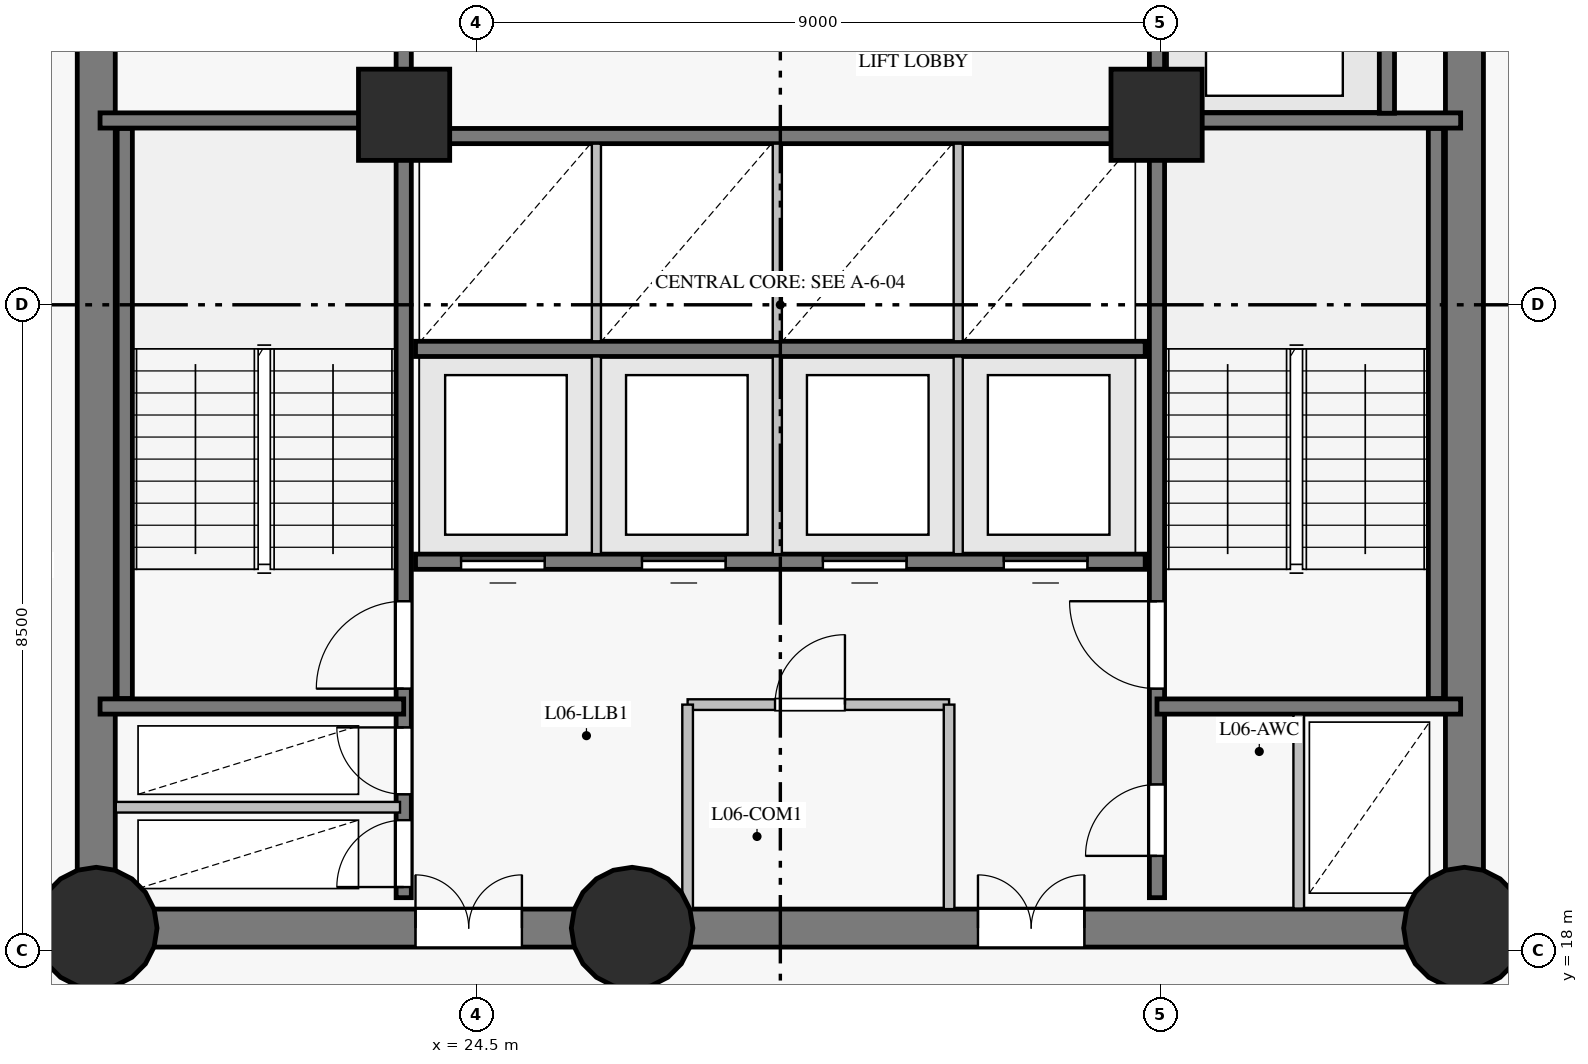
"""IFC4 building model, lengths in metres.
Left out: names, types, materials, properties, quantities, classifications, styles, units other than length and angle.
Written with IfcOpenShell. Run it as: python <this file> out.ifc"""

import sys

from ifc_helpers import new_model, si_unit, direction, frame, frame_2d, origin, origin_with_axes, origin_2d, place, context, subcontext, project, spatial, rectangle, circle, extrude, source, transform, mapped, element, fill, save


model = new_model("IFC4")
c1 = context("Model", 3, precision=1e-05, world=origin(), true_north=direction((0.0, 1.0)))
c2 = subcontext(c1, "Body", "Model", "MODEL_VIEW")
j1 = project(units=[si_unit("LENGTHUNIT", "METRE"), si_unit("PLANEANGLEUNIT", "RADIAN")], contexts=[c1])
p1 = place(None, origin())
s1 = spatial("IfcSite", under=j1, at=p1, CompositionType="ELEMENT")
p2 = place(p1, origin())
s2 = spatial("IfcBuilding", under=s1, at=p2, CompositionType="ELEMENT")
p3 = place(p2, frame((0.0, 0.0, 26.5)))
s3 = spatial("IfcBuildingStorey", under=s2, at=p3, CompositionType="ELEMENT", Elevation=26.5)
p4 = place(p3, frame((19.5, 18.3, 0.0), z_axis=(0.0, 0.0, 1.0), x_axis=(1.0, 0.0, 0.0)))
e1 = element("IfcWall", 1, at=p4, inside=s3, PredefinedType="SHEAR", context=c2, shape_type="SweptSolid", body=[
    extrude(rectangle(XDim=7.05, YDim=0.5, at=frame_2d((3.525, 0.0))), origin(), (0.0, 0.0, 1.0), 3.35),
])
p5 = place(p4, frame((4.2, 0.0, 0.0)))
e2 = element("IfcOpeningElement", 2, at=p5, cuts=e1, PredefinedType="OPENING", context=c2, shape_type="SweptSolid", body=[
    extrude(rectangle(XDim=1.4, YDim=2.2, at=frame_2d((0.7, 1.1))), frame((0.0, 0.26, 0.0), z_axis=(0.0, -1.0, 0.0), x_axis=(1.0, 0.0, 0.0)), (0.0, 0.0, 1.0), 0.52),
])
p6 = place(p3, frame((26.55, 18.3, 0.0), z_axis=(0.0, 0.0, 1.0), x_axis=(1.0, 0.0, 0.0)))
e3 = element("IfcWall", 3, at=p6, inside=s3, PredefinedType="SHEAR", context=c2, shape_type="SweptSolid", body=[
    extrude(rectangle(XDim=10.95, YDim=0.5, at=frame_2d((5.475, 0.0))), origin(), (0.0, 0.0, 1.0), 3.35),
])
p7 = place(p6, frame((4.55, 0.0, 0.0)))
e4 = element("IfcOpeningElement", 4, at=p7, cuts=e3, PredefinedType="OPENING", context=c2, shape_type="SweptSolid", body=[
    extrude(rectangle(XDim=1.4, YDim=2.2, at=frame_2d((0.7, 1.1))), frame((0.0, 0.26, 0.0), z_axis=(0.0, -1.0, 0.0), x_axis=(1.0, 0.0, 0.0)), (0.0, 0.0, 1.0), 0.52),
])
p8 = place(p3, frame((37.5, 18.3, 0.0), z_axis=(0.0, 0.0, 1.0), x_axis=(0.0, 1.0, 0.0)))
e5 = element("IfcWall", 5, at=p8, inside=s3, PredefinedType="SHEAR", context=c2, shape_type="SweptSolid", body=[
    extrude(rectangle(XDim=16.4, YDim=0.5, at=frame_2d((8.2, 0.0))), origin(), (0.0, 0.0, 1.0), 3.35),
])
p9 = place(p8, frame((14.06, 0.0, 0.0)))
e6 = element("IfcOpeningElement", 6, at=p9, cuts=e5, PredefinedType="OPENING", context=c2, shape_type="SweptSolid", body=[
    extrude(rectangle(XDim=1.2, YDim=2.15, at=frame_2d((0.6, 1.075))), frame((0.0, 0.26, 0.0), z_axis=(0.0, -1.0, 0.0), x_axis=(1.0, 0.0, 0.0)), (0.0, 0.0, 1.0), 0.52),
])
p10 = place(p3, frame((19.5, 34.7, 0.0), z_axis=(0.0, 0.0, 1.0), x_axis=(0.0, -1.0, 0.0)))
e7 = element("IfcWall", 7, at=p10, inside=s3, PredefinedType="SHEAR", context=c2, shape_type="SweptSolid", body=[
    extrude(rectangle(XDim=16.4, YDim=0.5, at=frame_2d((8.2, 0.0))), origin(), (0.0, 0.0, 1.0), 3.35),
])
p11 = place(p10, frame((3.1, 0.0, 0.0)))
e8 = element("IfcOpeningElement", 8, at=p11, cuts=e7, PredefinedType="OPENING", context=c2, shape_type="SweptSolid", body=[
    extrude(rectangle(XDim=1.1, YDim=2.15, at=frame_2d((0.55, 1.075))), frame((0.0, 0.26, 0.0), z_axis=(0.0, -1.0, 0.0), x_axis=(1.0, 0.0, 0.0)), (0.0, 0.0, 1.0), 0.52),
])
m1 = source(origin_with_axes(), c2, "Body", "SweptSolid", [
    extrude(circle(Radius=0.8, at=origin_2d()), origin(), (0.0, 0.0, 1.0), 3.6),
])
for number, where, z_axis, x_axis in (
    (9, (19.5, 18.3, 0.0), (0.0, 0.0, 1.0), (1.0, 0.0, 0.0)),
    (10, (26.55, 18.3, 0.0), (0.0, 0.0, 1.0), (1.0, 0.0, 0.0)),
    (11, (37.5, 18.3, 0.0), (0.0, 0.0, 1.0), (1.0, 0.0, 0.0)),
):
    element("IfcColumn", number, at=place(p3, frame(where, z_axis=z_axis, x_axis=x_axis)), inside=s3, PredefinedType="COLUMN", context=c2, shape_type="MappedRepresentation", body=[
        mapped(m1, transform((0.0, 0.0, 0.0), scale=1.0)),
    ])
m2 = source(origin_with_axes(), c2, "Body", "SweptSolid", [
    extrude(rectangle(XDim=1.2, YDim=1.2, at=origin_2d()), origin(), (0.0, 0.0, 1.0), 3.6),
])
for number, where, z_axis, x_axis in (
    (12, (23.55, 29.0, 0.0), (0.0, 0.0, 1.0), (1.0, 0.0, 0.0)),
    (13, (33.45, 29.0, 0.0), (0.0, 0.0, 1.0), (1.0, 0.0, 0.0)),
):
    element("IfcColumn", number, at=place(p3, frame(where, z_axis=z_axis, x_axis=x_axis)), inside=s3, PredefinedType="COLUMN", context=c2, shape_type="MappedRepresentation", body=[
        mapped(m2, transform((0.0, 0.0, 0.0), scale=1.0)),
    ])
p12 = place(p3, frame((23.545, 18.7, 0.0), z_axis=(0.0, 0.0, 1.0), x_axis=(0.0, 1.0, 0.0)))
e14 = element("IfcWall", 14, at=p12, inside=s3, PredefinedType="SHEAR", context=c2, shape_type="SweptSolid", body=[
    extrude(rectangle(XDim=15.6, YDim=0.2, at=frame_2d((7.8, 0.0))), origin(), (0.0, 0.0, 1.0), 3.35),
])
p13 = place(p12, frame((2.75, 0.0, 0.0)))
e15 = element("IfcOpeningElement", 15, at=p13, cuts=e14, PredefinedType="OPENING", context=c2, shape_type="SweptSolid", body=[
    extrude(rectangle(XDim=1.15, YDim=2.15, at=frame_2d((0.575, 1.075))), frame((0.0, 0.11, 0.0), z_axis=(0.0, -1.0, 0.0), x_axis=(1.0, 0.0, 0.0)), (0.0, 0.0, 1.0), 0.22),
])
p14 = place(p12, frame((0.14, 0.0, 0.0)))
e16 = element("IfcOpeningElement", 16, at=p14, cuts=e14, PredefinedType="OPENING", context=c2, shape_type="SweptSolid", body=[
    extrude(rectangle(XDim=0.88, YDim=2.1, at=frame_2d((0.44, 1.05))), frame((0.0, 0.11, 0.0), z_axis=(0.0, -1.0, 0.0), x_axis=(1.0, 0.0, 0.0)), (0.0, 0.0, 1.0), 0.22),
])
p15 = place(p12, frame((1.36, 0.0, 0.0)))
e17 = element("IfcOpeningElement", 17, at=p15, cuts=e14, PredefinedType="OPENING", context=c2, shape_type="SweptSolid", body=[
    extrude(rectangle(XDim=0.88, YDim=2.1, at=frame_2d((0.44, 1.05))), frame((0.0, 0.11, 0.0), z_axis=(0.0, -1.0, 0.0), x_axis=(1.0, 0.0, 0.0)), (0.0, 0.0, 1.0), 0.22),
])
p16 = place(p12, frame((12.1, 0.0, 0.0)))
e18 = element("IfcOpeningElement", 18, at=p16, cuts=e14, PredefinedType="OPENING", context=c2, shape_type="SweptSolid", body=[
    extrude(rectangle(XDim=1.12, YDim=2.15, at=frame_2d((0.56, 1.075))), frame((0.0, 0.11, 0.0), z_axis=(0.0, -1.0, 0.0), x_axis=(1.0, 0.0, 0.0)), (0.0, 0.0, 1.0), 0.22),
])
p17 = place(p12, frame((14.05, 0.0, 0.0)))
e19 = element("IfcOpeningElement", 19, at=p17, cuts=e14, PredefinedType="OPENING", context=c2, shape_type="SweptSolid", body=[
    extrude(rectangle(XDim=1.12, YDim=2.15, at=frame_2d((0.56, 1.075))), frame((0.0, 0.11, 0.0), z_axis=(0.0, -1.0, 0.0), x_axis=(1.0, 0.0, 0.0)), (0.0, 0.0, 1.0), 0.22),
])
p18 = place(p3, frame((33.455, 18.7, 0.0), z_axis=(0.0, 0.0, 1.0), x_axis=(0.0, 1.0, 0.0)))
e20 = element("IfcWall", 20, at=p18, inside=s3, PredefinedType="SHEAR", context=c2, shape_type="SweptSolid", body=[
    extrude(rectangle(XDim=15.6, YDim=0.2, at=frame_2d((7.8, 0.0))), origin(), (0.0, 0.0, 1.0), 3.35),
])
p19 = place(p18, frame((2.75, 0.0, 0.0)))
e21 = element("IfcOpeningElement", 21, at=p19, cuts=e20, PredefinedType="OPENING", context=c2, shape_type="SweptSolid", body=[
    extrude(rectangle(XDim=1.15, YDim=2.15, at=frame_2d((0.575, 1.075))), frame((0.0, 0.11, 0.0), z_axis=(0.0, -1.0, 0.0), x_axis=(1.0, 0.0, 0.0)), (0.0, 0.0, 1.0), 0.22),
])
p20 = place(p18, frame((0.55, 0.0, 0.0)))
e22 = element("IfcOpeningElement", 22, at=p20, cuts=e20, PredefinedType="OPENING", context=c2, shape_type="SweptSolid", body=[
    extrude(rectangle(XDim=0.94, YDim=2.1, at=frame_2d((0.47, 1.05))), frame((0.0, 0.11, 0.0), z_axis=(0.0, -1.0, 0.0), x_axis=(1.0, 0.0, 0.0)), (0.0, 0.0, 1.0), 0.22),
])
p21 = place(p3, frame((23.7, 23.12, 0.0), z_axis=(0.0, 0.0, 1.0), x_axis=(1.0, 0.0, 0.0)))
e23 = element("IfcWall", 23, at=p21, inside=s3, PredefinedType="SHEAR", context=c2, shape_type="SweptSolid", body=[
    extrude(rectangle(XDim=9.6, YDim=0.2, at=frame_2d((4.8, 0.0))), origin(), (0.0, 0.0, 1.0), 3.35),
])
p22 = place(p21, frame((0.6, 0.0, 0.0)))
e24 = element("IfcOpeningElement", 24, at=p22, cuts=e23, PredefinedType="OPENING", context=c2, shape_type="SweptSolid", body=[
    extrude(rectangle(XDim=1.1, YDim=2.15, at=frame_2d((0.55, 1.075))), frame((0.0, 0.11, 0.0), z_axis=(0.0, -1.0, 0.0), x_axis=(1.0, 0.0, 0.0)), (0.0, 0.0, 1.0), 0.22),
])
p23 = place(p21, frame((2.98, 0.0, 0.0)))
e25 = element("IfcOpeningElement", 25, at=p23, cuts=e23, PredefinedType="OPENING", context=c2, shape_type="SweptSolid", body=[
    extrude(rectangle(XDim=1.1, YDim=2.15, at=frame_2d((0.55, 1.075))), frame((0.0, 0.11, 0.0), z_axis=(0.0, -1.0, 0.0), x_axis=(1.0, 0.0, 0.0)), (0.0, 0.0, 1.0), 0.22),
])
p24 = place(p21, frame((5.36, 0.0, 0.0)))
e26 = element("IfcOpeningElement", 26, at=p24, cuts=e23, PredefinedType="OPENING", context=c2, shape_type="SweptSolid", body=[
    extrude(rectangle(XDim=1.1, YDim=2.15, at=frame_2d((0.55, 1.075))), frame((0.0, 0.11, 0.0), z_axis=(0.0, -1.0, 0.0), x_axis=(1.0, 0.0, 0.0)), (0.0, 0.0, 1.0), 0.22),
])
p25 = place(p21, frame((7.74, 0.0, 0.0)))
e27 = element("IfcOpeningElement", 27, at=p25, cuts=e23, PredefinedType="OPENING", context=c2, shape_type="SweptSolid", body=[
    extrude(rectangle(XDim=1.1, YDim=2.15, at=frame_2d((0.55, 1.075))), frame((0.0, 0.11, 0.0), z_axis=(0.0, -1.0, 0.0), x_axis=(1.0, 0.0, 0.0)), (0.0, 0.0, 1.0), 0.22),
])
for number, where, z_axis, x_axis in (
    (28, (23.7, 25.92, 0.0), (0.0, 0.0, 1.0), (1.0, 0.0, 0.0)),
    (29, (23.7, 28.72, 0.0), (0.0, 0.0, 1.0), (1.0, 0.0, 0.0)),
):
    element("IfcWall", number, at=place(p3, frame(where, z_axis=z_axis, x_axis=x_axis)), inside=s3, PredefinedType="SHEAR", context=c2, shape_type="SweptSolid", body=[
        extrude(rectangle(XDim=9.6, YDim=0.2, at=frame_2d((4.8, 0.0))), origin(), (0.0, 0.0, 1.0), 3.35),
    ])
for number, where, z_axis, x_axis in (
    (30, (19.875, 21.32, 0.0), (0.0, 0.0, 1.0), (0.0, 1.0, 0.0)),
    (31, (37.125, 21.32, 0.0), (0.0, 0.0, 1.0), (0.0, 1.0, 0.0)),
):
    element("IfcWall", number, at=place(p3, frame(where, z_axis=z_axis, x_axis=x_axis)), inside=s3, PredefinedType="SHEAR", context=c2, shape_type="SweptSolid", body=[
        extrude(rectangle(XDim=7.5, YDim=0.2, at=frame_2d((3.75, 0.0))), origin(), (0.0, 0.0, 1.0), 3.35),
    ])
for number, where, z_axis, x_axis in (
    (32, (33.455, 21.215, 0.0), (0.0, 0.0, 1.0), (1.0, 0.0, 0.0)),
    (33, (33.455, 28.925, 0.0), (0.0, 0.0, 1.0), (1.0, 0.0, 0.0)),
    (34, (19.55, 21.215, 0.0), (0.0, 0.0, 1.0), (1.0, 0.0, 0.0)),
    (35, (19.55, 28.925, 0.0), (0.0, 0.0, 1.0), (1.0, 0.0, 0.0)),
):
    element("IfcWall", number, at=place(p3, frame(where, z_axis=z_axis, x_axis=x_axis)), inside=s3, PredefinedType="SHEAR", context=c2, shape_type="SweptSolid", body=[
        extrude(rectangle(XDim=3.995, YDim=0.2, at=frame_2d((1.998, 0.0))), origin(), (0.0, 0.0, 1.0), 3.35),
    ])
p26 = place(p3, frame((36.48, 29.02, 0.0), z_axis=(0.0, 0.0, 1.0), x_axis=(0.0, 1.0, 0.0)))
e36 = element("IfcWall", 36, at=p26, inside=s3, PredefinedType="SHEAR", context=c2, shape_type="SweptSolid", body=[
    extrude(rectangle(XDim=2.86, YDim=0.2, at=frame_2d((1.43, 0.0))), origin(), (0.0, 0.0, 1.0), 3.35),
])
p27 = place(p3, frame((19.757, 19.89, 0.0), z_axis=(0.0, 0.0, 1.0), x_axis=(1.0, 0.0, 0.0)))
e37 = element("IfcWall", 37, at=p27, inside=s3, PredefinedType="PARTITIONING", context=c2, shape_type="SweptSolid", body=[
    extrude(rectangle(XDim=3.739, YDim=0.14, at=frame_2d((1.87, 0.0))), origin(), (0.0, 0.0, 1.0), 3.35),
])
p28 = place(p3, frame((27.28, 21.24, 0.0), z_axis=(0.0, 0.0, 1.0), x_axis=(1.0, 0.0, 0.0)))
e38 = element("IfcWall", 38, at=p28, inside=s3, PredefinedType="PARTITIONING", context=c2, shape_type="SweptSolid", body=[
    extrude(rectangle(XDim=3.44, YDim=0.14, at=frame_2d((1.72, 0.0))), origin(), (0.0, 0.0, 1.0), 3.35),
])
p29 = place(p28, frame((1.15, 0.0, 0.0)))
e39 = element("IfcOpeningElement", 39, at=p29, cuts=e38, PredefinedType="OPENING", context=c2, shape_type="SweptSolid", body=[
    extrude(rectangle(XDim=0.92, YDim=2.1, at=frame_2d((0.46, 1.05))), frame((0.0, 0.08, 0.0), z_axis=(0.0, -1.0, 0.0), x_axis=(1.0, 0.0, 0.0)), (0.0, 0.0, 1.0), 0.16),
])
for number, where, z_axis, x_axis in (
    (40, (27.28, 18.55, 0.0), (0.0, 0.0, 1.0), (0.0, 1.0, 0.0)),
    (41, (30.72, 18.55, 0.0), (0.0, 0.0, 1.0), (0.0, 1.0, 0.0)),
):
    element("IfcWall", number, at=place(p3, frame(where, z_axis=z_axis, x_axis=x_axis)), inside=s3, PredefinedType="PARTITIONING", context=c2, shape_type="SweptSolid", body=[
        extrude(rectangle(XDim=2.69, YDim=0.14, at=frame_2d((1.345, 0.0))), origin(), (0.0, 0.0, 1.0), 3.35),
    ])
for number, where, z_axis, x_axis in (
    (42, (26.08, 23.22, 0.0), (0.0, 0.0, 1.0), (0.0, 1.0, 0.0)),
    (43, (28.46, 23.22, 0.0), (0.0, 0.0, 1.0), (0.0, 1.0, 0.0)),
    (44, (30.84, 23.22, 0.0), (0.0, 0.0, 1.0), (0.0, 1.0, 0.0)),
    (45, (26.08, 26.02, 0.0), (0.0, 0.0, 1.0), (0.0, 1.0, 0.0)),
    (46, (28.46, 26.02, 0.0), (0.0, 0.0, 1.0), (0.0, 1.0, 0.0)),
    (47, (30.84, 26.02, 0.0), (0.0, 0.0, 1.0), (0.0, 1.0, 0.0)),
):
    element("IfcWall", number, at=place(p3, frame(where, z_axis=z_axis, x_axis=x_axis)), inside=s3, PredefinedType="PARTITIONING", context=c2, shape_type="SweptSolid", body=[
        extrude(rectangle(XDim=2.6, YDim=0.12, at=frame_2d((1.3, 0.0))), origin(), (0.0, 0.0, 1.0), 3.35),
    ])
p30 = place(p3, frame((35.32, 18.557, 0.0), z_axis=(0.0, 0.0, 1.0), x_axis=(0.0, 1.0, 0.0)))
e48 = element("IfcWall", 48, at=p30, inside=s3, PredefinedType="PARTITIONING", context=c2, shape_type="SweptSolid", body=[
    extrude(rectangle(XDim=2.553, YDim=0.14, at=frame_2d((1.277, 0.0))), origin(), (0.0, 0.0, 1.0), 3.35),
])
m3 = source(origin_with_axes(), c2, "Body", "SweptSolid", [
    extrude(rectangle(XDim=1.15, YDim=2.15, at=frame_2d((0.575, 1.075))), frame((0.0, 0.025, 0.0), z_axis=(0.0, -1.0, 0.0), x_axis=(1.0, 0.0, 0.0)), (0.0, 0.0, 1.0), 0.05),
])
p31 = place(p13, origin())
e49 = element("IfcDoor", 49, at=p31, inside=s3, OperationType="SINGLE_SWING_LEFT", PredefinedType="DOOR", context=c2, shape_type="MappedRepresentation", body=[
    mapped(m3, transform((0.0, 0.0, 0.0), scale=1.0)),
])
fill(e15, e49)
p32 = place(p19, origin())
e50 = element("IfcDoor", 50, at=p32, inside=s3, OperationType="SINGLE_SWING_RIGHT", PredefinedType="DOOR", context=c2, shape_type="MappedRepresentation", body=[
    mapped(m3, transform((0.0, 0.0, 0.0), scale=1.0)),
])
fill(e21, e50)
m4 = source(origin_with_axes(), c2, "Body", "SweptSolid", [
    extrude(rectangle(XDim=0.88, YDim=2.1, at=frame_2d((0.44, 1.05))), frame((0.0, 0.025, 0.0), z_axis=(0.0, -1.0, 0.0), x_axis=(1.0, 0.0, 0.0)), (0.0, 0.0, 1.0), 0.05),
])
p33 = place(p14, origin())
e51 = element("IfcDoor", 51, at=p33, inside=s3, OperationType="SINGLE_SWING_LEFT", PredefinedType="DOOR", context=c2, shape_type="MappedRepresentation", body=[
    mapped(m4, transform((0.0, 0.0, 0.0), scale=1.0)),
])
fill(e16, e51)
p34 = place(p15, origin())
e52 = element("IfcDoor", 52, at=p34, inside=s3, OperationType="SINGLE_SWING_RIGHT", PredefinedType="DOOR", context=c2, shape_type="MappedRepresentation", body=[
    mapped(m4, transform((0.0, 0.0, 0.0), scale=1.0)),
])
fill(e17, e52)
m5 = source(origin_with_axes(), c2, "Body", "SweptSolid", [
    extrude(rectangle(XDim=1.4, YDim=2.2, at=frame_2d((0.7, 1.1))), frame((0.0, 0.025, 0.0), z_axis=(0.0, -1.0, 0.0), x_axis=(1.0, 0.0, 0.0)), (0.0, 0.0, 1.0), 0.05),
])
p35 = place(p5, origin())
e53 = element("IfcDoor", 53, at=p35, inside=s3, OperationType="DOUBLE_DOOR_SINGLE_SWING", PredefinedType="DOOR", context=c2, shape_type="MappedRepresentation", body=[
    mapped(m5, transform((0.0, 0.0, 0.0), scale=1.0)),
])
fill(e2, e53)
p36 = place(p7, origin())
e54 = element("IfcDoor", 54, at=p36, inside=s3, OperationType="DOUBLE_DOOR_SINGLE_SWING", PredefinedType="DOOR", context=c2, shape_type="MappedRepresentation", body=[
    mapped(m5, transform((0.0, 0.0, 0.0), scale=1.0)),
])
fill(e4, e54)
m6 = source(origin_with_axes(), c2, "Body", "SweptSolid", [
    extrude(rectangle(XDim=0.94, YDim=2.1, at=frame_2d((0.47, 1.05))), frame((0.0, 0.025, 0.0), z_axis=(0.0, -1.0, 0.0), x_axis=(1.0, 0.0, 0.0)), (0.0, 0.0, 1.0), 0.05),
])
p37 = place(p20, origin())
e55 = element("IfcDoor", 55, at=p37, inside=s3, OperationType="SINGLE_SWING_LEFT", PredefinedType="DOOR", context=c2, shape_type="MappedRepresentation", body=[
    mapped(m6, transform((0.0, 0.0, 0.0), scale=1.0)),
])
fill(e22, e55)
m7 = source(origin_with_axes(), c2, "Body", "SweptSolid", [
    extrude(rectangle(XDim=0.92, YDim=2.1, at=frame_2d((0.46, 1.05))), frame((0.0, 0.025, 0.0), z_axis=(0.0, -1.0, 0.0), x_axis=(1.0, 0.0, 0.0)), (0.0, 0.0, 1.0), 0.05),
])
p38 = place(p29, origin())
e56 = element("IfcDoor", 56, at=p38, inside=s3, OperationType="SINGLE_SWING_RIGHT", PredefinedType="DOOR", context=c2, shape_type="MappedRepresentation", body=[
    mapped(m7, transform((0.0, 0.0, 0.0), scale=1.0)),
])
fill(e39, e56)
m8 = source(origin_with_axes(), c2, "Body", "SweptSolid", [
    extrude(rectangle(XDim=1.1, YDim=2.15, at=frame_2d((0.55, 1.075))), frame((0.0, 0.025, 0.0), z_axis=(0.0, -1.0, 0.0), x_axis=(1.0, 0.0, 0.0)), (0.0, 0.0, 1.0), 0.05),
])
p39 = place(p22, origin())
e57 = element("IfcDoor", 57, at=p39, inside=s3, OperationType="SLIDING_TO_LEFT", PredefinedType="DOOR", context=c2, shape_type="MappedRepresentation", body=[
    mapped(m8, transform((0.0, 0.0, 0.0), scale=1.0)),
])
fill(e24, e57)
p40 = place(p23, origin())
e58 = element("IfcDoor", 58, at=p40, inside=s3, OperationType="SLIDING_TO_RIGHT", PredefinedType="DOOR", context=c2, shape_type="MappedRepresentation", body=[
    mapped(m8, transform((0.0, 0.0, 0.0), scale=1.0)),
])
fill(e25, e58)
p41 = place(p24, origin())
e59 = element("IfcDoor", 59, at=p41, inside=s3, OperationType="SLIDING_TO_LEFT", PredefinedType="DOOR", context=c2, shape_type="MappedRepresentation", body=[
    mapped(m8, transform((0.0, 0.0, 0.0), scale=1.0)),
])
fill(e26, e59)
p42 = place(p25, origin())
e60 = element("IfcDoor", 60, at=p42, inside=s3, OperationType="SLIDING_TO_RIGHT", PredefinedType="DOOR", context=c2, shape_type="MappedRepresentation", body=[
    mapped(m8, transform((0.0, 0.0, 0.0), scale=1.0)),
])
fill(e27, e60)
save(model, sys.argv[1])
